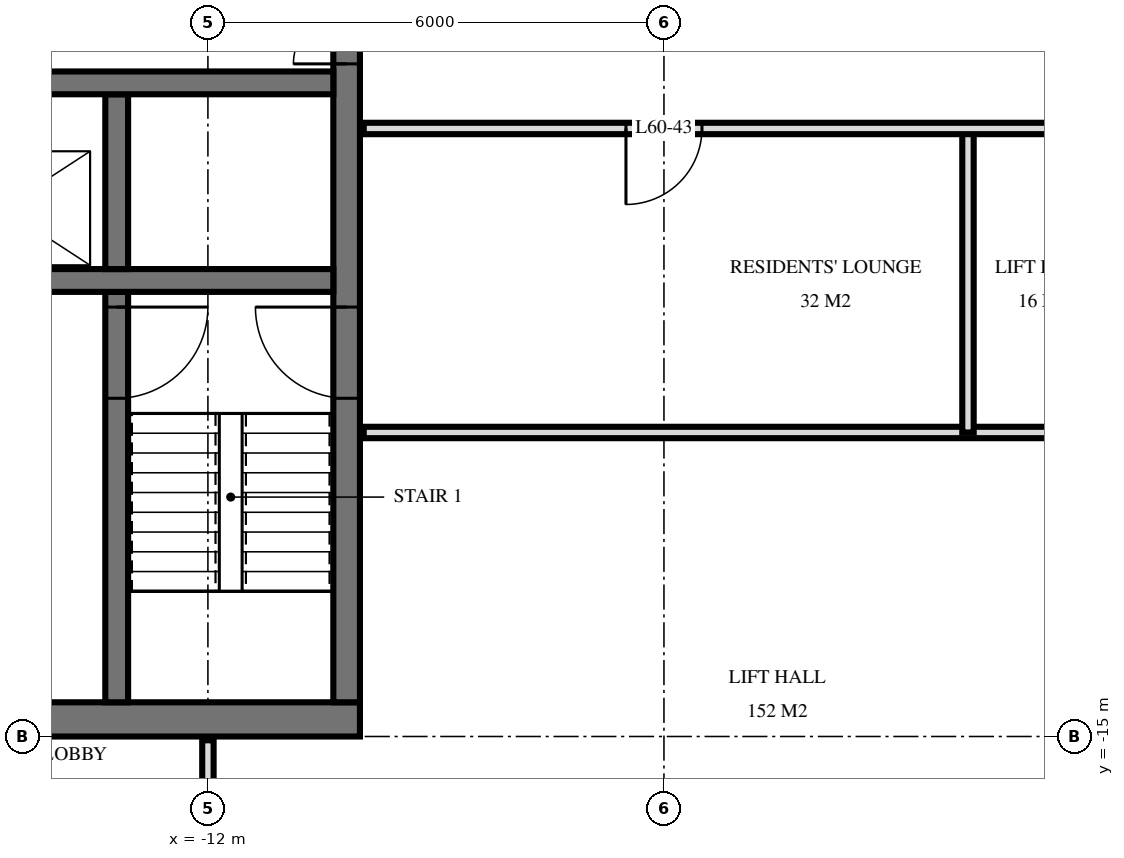
"""IFC4 building model, lengths in metres.
Left out: names, types, materials, properties, quantities, classifications, styles, units other than length and angle.
Written with IfcOpenShell. Run it as: python <this file> out.ifc"""

import sys

from ifc_helpers import new_model, si_unit, direction, frame, frame_2d, origin, place, context, subcontext, project, spatial, rectangle, extrude, element, fill, save


model = new_model("IFC4")
c1 = context("Model", 3, precision=1e-05, world=origin(), true_north=direction((0.0, 1.0)))
c2 = subcontext(c1, "Body", "Model", "MODEL_VIEW")
j1 = project(units=[si_unit("LENGTHUNIT", "METRE"), si_unit("PLANEANGLEUNIT", "RADIAN")], contexts=[c1])
p1 = place(None, origin())
s1 = spatial("IfcSite", under=j1, at=p1, CompositionType="ELEMENT")
p2 = place(p1, origin())
s2 = spatial("IfcBuilding", under=s1, at=p2, CompositionType="ELEMENT")
p3 = place(p2, frame((0.0, 0.0, 229.1)))
s3 = spatial("IfcBuildingStorey", under=s2, at=p3, CompositionType="ELEMENT", Elevation=229.1)
p4 = place(p3, frame((-24.5, -14.775, 0.0), z_axis=(0.0, 0.0, 1.0), x_axis=(1.0, 0.0, 0.0)))
e1 = element("IfcWall", 1, at=p4, inside=s3, PredefinedType="SHEAR", context=c2, shape_type="SweptSolid", body=[
    extrude(rectangle(XDim=14.5, YDim=0.45, at=frame_2d((7.25, 0.0))), origin(), (0.0, 0.0, 1.0), 3.5),
])
p5 = place(p4, frame((6.2, 0.0, 0.0)))
e2 = element("IfcOpeningElement", 2, at=p5, cuts=e1, PredefinedType="OPENING", context=c2, shape_type="SweptSolid", body=[
    extrude(rectangle(XDim=1.2, YDim=2.1, at=frame_2d((0.6, 1.05))), frame((0.0, 0.235, 0.0), z_axis=(0.0, -1.0, 0.0), x_axis=(1.0, 0.0, 0.0)), (0.0, 0.0, 1.0), 0.47),
])
p6 = place(p4, frame((9.25, 0.0, 0.0)))
e3 = element("IfcOpeningElement", 3, at=p6, cuts=e1, PredefinedType="OPENING", context=c2, shape_type="SweptSolid", body=[
    extrude(rectangle(XDim=1.1, YDim=2.1, at=frame_2d((0.55, 1.05))), frame((0.0, 0.235, 0.0), z_axis=(0.0, -1.0, 0.0), x_axis=(1.0, 0.0, 0.0)), (0.0, 0.0, 1.0), 0.47),
])
p7 = place(p4, frame((3.5, 0.0, 0.0)))
e4 = element("IfcOpeningElement", 4, at=p7, cuts=e1, PredefinedType="OPENING", context=c2, shape_type="SweptSolid", body=[
    extrude(rectangle(XDim=0.9, YDim=2.1, at=frame_2d((0.45, 1.05))), frame((0.0, 0.235, 0.0), z_axis=(0.0, -1.0, 0.0), x_axis=(1.0, 0.0, 0.0)), (0.0, 0.0, 1.0), 0.47),
])
p8 = place(p4, frame((1.05, 0.0, 0.0)))
e5 = element("IfcOpeningElement", 5, at=p8, cuts=e1, PredefinedType="OPENING", context=c2, shape_type="SweptSolid", body=[
    extrude(rectangle(XDim=1.0, YDim=2.1, at=frame_2d((0.5, 1.05))), frame((0.0, 0.235, 0.0), z_axis=(0.0, -1.0, 0.0), x_axis=(1.0, 0.0, 0.0)), (0.0, 0.0, 1.0), 0.47),
])
p9 = place(p3, frame((-10.175, -14.55, 0.0), z_axis=(0.0, 0.0, 1.0), x_axis=(0.0, 1.0, 0.0)))
e6 = element("IfcWall", 6, at=p9, inside=s3, PredefinedType="SHEAR", context=c2, shape_type="SweptSolid", body=[
    extrude(rectangle(XDim=14.1, YDim=0.35, at=frame_2d((7.05, 0.0))), origin(), (0.0, 0.0, 1.0), 3.5),
])
p10 = place(p9, frame((8.4, 0.0, 0.0)))
e7 = element("IfcOpeningElement", 7, at=p10, cuts=e6, PredefinedType="OPENING", context=c2, shape_type="SweptSolid", body=[
    extrude(rectangle(XDim=1.4, YDim=2.4, at=frame_2d((0.7, 1.2))), frame((0.0, 0.185, 0.0), z_axis=(0.0, -1.0, 0.0), x_axis=(1.0, 0.0, 0.0)), (0.0, 0.0, 1.0), 0.37),
])
p11 = place(p9, frame((10.0, 0.0, 0.0)))
e8 = element("IfcOpeningElement", 8, at=p11, cuts=e6, PredefinedType="OPENING", context=c2, shape_type="SweptSolid", body=[
    extrude(rectangle(XDim=1.4, YDim=2.4, at=frame_2d((0.7, 1.2))), frame((0.0, 0.185, 0.0), z_axis=(0.0, -1.0, 0.0), x_axis=(1.0, 0.0, 0.0)), (0.0, 0.0, 1.0), 0.37),
])
p12 = place(p9, frame((4.0, 0.0, 0.0)))
e9 = element("IfcOpeningElement", 9, at=p12, cuts=e6, PredefinedType="OPENING", context=c2, shape_type="SweptSolid", body=[
    extrude(rectangle(XDim=1.2, YDim=2.1, at=frame_2d((0.6, 1.05))), frame((0.0, 0.185, 0.0), z_axis=(0.0, -1.0, 0.0), x_axis=(1.0, 0.0, 0.0)), (0.0, 0.0, 1.0), 0.37),
])
p13 = place(p3, frame((-24.05, -6.4, 0.0), z_axis=(0.0, 0.0, 1.0), x_axis=(1.0, 0.0, 0.0)))
e10 = element("IfcWall", 10, at=p13, inside=s3, PredefinedType="SHEAR", context=c2, shape_type="SweptSolid", body=[
    extrude(rectangle(XDim=13.7, YDim=0.3, at=frame_2d((6.85, 0.0))), origin(), (0.0, 0.0, 1.0), 3.5),
])
p14 = place(p13, frame((0.55, 0.0, 0.0)))
e11 = element("IfcOpeningElement", 11, at=p14, cuts=e10, PredefinedType="OPENING", context=c2, shape_type="SweptSolid", body=[
    extrude(rectangle(XDim=1.1, YDim=2.1, at=frame_2d((0.55, 1.05))), frame((0.0, 0.16, 0.0), z_axis=(0.0, -1.0, 0.0), x_axis=(1.0, 0.0, 0.0)), (0.0, 0.0, 1.0), 0.32),
])
p15 = place(p13, frame((5.8, 0.0, 0.0)))
e12 = element("IfcOpeningElement", 12, at=p15, cuts=e10, PredefinedType="OPENING", context=c2, shape_type="SweptSolid", body=[
    extrude(rectangle(XDim=1.1, YDim=2.1, at=frame_2d((0.55, 1.05))), frame((0.0, 0.16, 0.0), z_axis=(0.0, -1.0, 0.0), x_axis=(1.0, 0.0, 0.0)), (0.0, 0.0, 1.0), 0.32),
])
p16 = place(p3, frame((-24.05, -9.0, 0.0), z_axis=(0.0, 0.0, 1.0), x_axis=(1.0, 0.0, 0.0)))
e13 = element("IfcWall", 13, at=p16, inside=s3, PredefinedType="SHEAR", context=c2, shape_type="SweptSolid", body=[
    extrude(rectangle(XDim=13.7, YDim=0.3, at=frame_2d((6.85, 0.0))), origin(), (0.0, 0.0, 1.0), 3.5),
])
p17 = place(p16, frame((8.8, 0.0, 0.0)))
e14 = element("IfcOpeningElement", 14, at=p17, cuts=e13, PredefinedType="OPENING", context=c2, shape_type="SweptSolid", body=[
    extrude(rectangle(XDim=1.1, YDim=2.1, at=frame_2d((0.55, 1.05))), frame((0.0, 0.16, 0.0), z_axis=(0.0, -1.0, 0.0), x_axis=(1.0, 0.0, 0.0)), (0.0, 0.0, 1.0), 0.32),
])
p18 = place(p3, frame((-13.2, -8.85, 0.0), z_axis=(0.0, 0.0, 1.0), x_axis=(0.0, 1.0, 0.0)))
e15 = element("IfcWall", 15, at=p18, inside=s3, PredefinedType="SHEAR", context=c2, shape_type="SweptSolid", body=[
    extrude(rectangle(XDim=2.3, YDim=0.3, at=frame_2d((1.15, 0.0))), origin(), (0.0, 0.0, 1.0), 3.5),
])
p19 = place(p3, frame((-13.2, -14.55, 0.0), z_axis=(0.0, 0.0, 1.0), x_axis=(0.0, 1.0, 0.0)))
e16 = element("IfcWall", 16, at=p19, inside=s3, PredefinedType="SHEAR", context=c2, shape_type="SweptSolid", body=[
    extrude(rectangle(XDim=5.4, YDim=0.3, at=frame_2d((2.7, 0.0))), origin(), (0.0, 0.0, 1.0), 3.5),
])
p20 = place(p19, frame((4.0, 0.0, 0.0)))
e17 = element("IfcOpeningElement", 17, at=p20, cuts=e16, PredefinedType="OPENING", context=c2, shape_type="SweptSolid", body=[
    extrude(rectangle(XDim=1.2, YDim=2.1, at=frame_2d((0.6, 1.05))), frame((0.0, 0.16, 0.0), z_axis=(0.0, -1.0, 0.0), x_axis=(1.0, 0.0, 0.0)), (0.0, 0.0, 1.0), 0.32),
])
p21 = place(p3, frame((-2.0, -11.0, 0.0), z_axis=(0.0, 0.0, 1.0), x_axis=(0.0, 1.0, 0.0)))
e18 = element("IfcWall", 18, at=p21, inside=s3, PredefinedType="PARTITIONING", context=c2, shape_type="SweptSolid", body=[
    extrude(rectangle(XDim=4.0, YDim=0.15, at=frame_2d((2.0, 0.0))), origin(), (0.0, 0.0, 1.0), 3.22),
])
p22 = place(p3, frame((-12.0, -18.0, 0.0), z_axis=(0.0, 0.0, 1.0), x_axis=(0.0, 1.0, 0.0)))
e19 = element("IfcWall", 19, at=p22, inside=s3, PredefinedType="PARTITIONING", context=c2, shape_type="SweptSolid", body=[
    extrude(rectangle(XDim=2.95, YDim=0.15, at=frame_2d((1.475, 0.0))), origin(), (0.0, 0.0, 1.0), 3.22),
])
p23 = place(p22, frame((1.0, 0.0, 0.0)))
e20 = element("IfcOpeningElement", 20, at=p23, cuts=e19, PredefinedType="OPENING", context=c2, shape_type="SweptSolid", body=[
    extrude(rectangle(XDim=1.0, YDim=2.1, at=frame_2d((0.5, 1.05))), frame((0.0, 0.085, 0.0), z_axis=(0.0, -1.0, 0.0), x_axis=(1.0, 0.0, 0.0)), (0.0, 0.0, 1.0), 0.17),
])
p24 = place(p3, frame((-9.95, -11.0, 0.0), z_axis=(0.0, 0.0, 1.0), x_axis=(1.0, 0.0, 0.0)))
e21 = element("IfcWall", 21, at=p24, inside=s3, PredefinedType="PARTITIONING", context=c2, shape_type="SweptSolid", body=[
    extrude(rectangle(XDim=19.9, YDim=0.15, at=frame_2d((9.95, 0.0))), origin(), (0.0, 0.0, 1.0), 3.22),
])
p25 = place(p24, frame((9.45, 0.0, 0.0)))
e22 = element("IfcOpeningElement", 22, at=p25, cuts=e21, PredefinedType="OPENING", context=c2, shape_type="SweptSolid", body=[
    extrude(rectangle(XDim=1.0, YDim=2.1, at=frame_2d((0.5, 1.05))), frame((0.0, 0.085, 0.0), z_axis=(0.0, -1.0, 0.0), x_axis=(1.0, 0.0, 0.0)), (0.0, 0.0, 1.0), 0.17),
])
p26 = place(p24, frame((15.45, 0.0, 0.0)))
e23 = element("IfcOpeningElement", 23, at=p26, cuts=e21, PredefinedType="OPENING", context=c2, shape_type="SweptSolid", body=[
    extrude(rectangle(XDim=1.0, YDim=2.1, at=frame_2d((0.5, 1.05))), frame((0.0, 0.085, 0.0), z_axis=(0.0, -1.0, 0.0), x_axis=(1.0, 0.0, 0.0)), (0.0, 0.0, 1.0), 0.17),
])
p27 = place(p3, frame((-9.95, -7.0, 0.0), z_axis=(0.0, 0.0, 1.0), x_axis=(1.0, 0.0, 0.0)))
e24 = element("IfcWall", 24, at=p27, inside=s3, PredefinedType="PARTITIONING", context=c2, shape_type="SweptSolid", body=[
    extrude(rectangle(XDim=19.9, YDim=0.15, at=frame_2d((9.95, 0.0))), origin(), (0.0, 0.0, 1.0), 3.22),
])
p28 = place(p27, frame((9.45, 0.0, 0.0)))
e25 = element("IfcOpeningElement", 25, at=p28, cuts=e24, PredefinedType="OPENING", context=c2, shape_type="SweptSolid", body=[
    extrude(rectangle(XDim=1.0, YDim=2.1, at=frame_2d((0.5, 1.05))), frame((0.0, 0.085, 0.0), z_axis=(0.0, -1.0, 0.0), x_axis=(1.0, 0.0, 0.0)), (0.0, 0.0, 1.0), 0.17),
])
p29 = place(p27, frame((3.45, 0.0, 0.0)))
e26 = element("IfcOpeningElement", 26, at=p29, cuts=e24, PredefinedType="OPENING", context=c2, shape_type="SweptSolid", body=[
    extrude(rectangle(XDim=1.0, YDim=2.1, at=frame_2d((0.5, 1.05))), frame((0.0, 0.085, 0.0), z_axis=(0.0, -1.0, 0.0), x_axis=(1.0, 0.0, 0.0)), (0.0, 0.0, 1.0), 0.17),
])
p30 = place(p10, origin())
e27 = element("IfcDoor", 27, at=p30, inside=s3, OperationType="DOUBLE_DOOR_SINGLE_SWING", PredefinedType="DOOR", context=c2, shape_type="SweptSolid", body=[
    extrude(rectangle(XDim=1.4, YDim=2.4, at=frame_2d((0.7, 1.2))), frame((0.0, 0.025, 0.0), z_axis=(0.0, -1.0, 0.0), x_axis=(1.0, 0.0, 0.0)), (0.0, 0.0, 1.0), 0.05),
])
fill(e7, e27)
p31 = place(p12, origin())
e28 = element("IfcDoor", 28, at=p31, inside=s3, OperationType="SINGLE_SWING_LEFT", PredefinedType="DOOR", context=c2, shape_type="SweptSolid", body=[
    extrude(rectangle(XDim=1.2, YDim=2.1, at=frame_2d((0.6, 1.05))), frame((0.0, 0.025, 0.0), z_axis=(0.0, -1.0, 0.0), x_axis=(1.0, 0.0, 0.0)), (0.0, 0.0, 1.0), 0.05),
])
fill(e9, e28)
p32 = place(p20, frame((0.6, 0.0, 0.0), z_axis=(0.0, 0.0, 1.0), x_axis=(-1.0, 0.0, 0.0)))
e29 = element("IfcDoor", 29, at=p32, inside=s3, OperationType="SINGLE_SWING_RIGHT", PredefinedType="DOOR", context=c2, shape_type="SweptSolid", body=[
    extrude(rectangle(XDim=1.2, YDim=2.1, at=frame_2d((0.0, 1.05))), frame((0.0, -0.025, 0.0), z_axis=(0.0, 1.0, 0.0), x_axis=(-1.0, 0.0, 0.0)), (0.0, 0.0, 1.0), 0.05),
])
fill(e17, e29)
p33 = place(p29, frame((0.5, 0.0, 0.0), z_axis=(0.0, 0.0, 1.0), x_axis=(-1.0, 0.0, 0.0)))
e30 = element("IfcDoor", 30, at=p33, inside=s3, OperationType="SINGLE_SWING_LEFT", PredefinedType="DOOR", context=c2, shape_type="SweptSolid", body=[
    extrude(rectangle(XDim=1.0, YDim=2.1, at=frame_2d((0.0, 1.05))), frame((0.0, -0.025, 0.0), z_axis=(0.0, 1.0, 0.0), x_axis=(-1.0, 0.0, 0.0)), (0.0, 0.0, 1.0), 0.05),
])
fill(e26, e30)
save(model, sys.argv[1])
